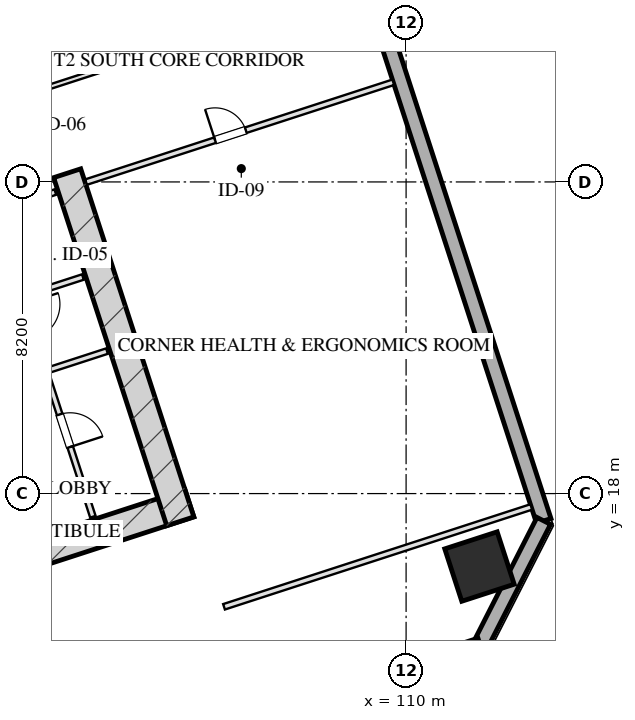
"""IFC4 building model, lengths in metres.
Left out: names, types, materials, properties, quantities, classifications, styles, units other than length and angle.
Written with IfcOpenShell. Run it as: python <this file> out.ifc"""

import sys

from ifc_helpers import new_model, si_unit, direction, frame, frame_2d, origin, origin_2d, place, context, subcontext, project, spatial, rectangle, hollow_rectangle, extrude, element, fill, save


model = new_model("IFC4")
c1 = context("Model", 3, precision=1e-05, world=origin(), true_north=direction((0.0, 1.0)))
c2 = subcontext(c1, "Body", "Model", "MODEL_VIEW")
j1 = project(units=[si_unit("LENGTHUNIT", "METRE"), si_unit("PLANEANGLEUNIT", "RADIAN")], contexts=[c1])
p1 = place(None, origin())
s1 = spatial("IfcSite", under=j1, at=p1, CompositionType="ELEMENT")
p2 = place(p1, origin())
s2 = spatial("IfcBuilding", under=s1, at=p2, CompositionType="ELEMENT")
p3 = place(p2, frame((0.0, 0.0, 85.1)))
s3 = spatial("IfcBuildingStorey", under=s2, at=p3, CompositionType="ELEMENT", Elevation=85.1)
p4 = place(p3, frame((88.559, 12.629, 0.0), z_axis=(0.0, 0.0, 1.0), x_axis=(0.951056072937, 0.309018358888, 0.0)))
e1 = element("IfcWall", 1, at=p4, inside=s3, PredefinedType="SHEAR", context=c2, shape_type="SweptSolid", body=[
    extrude(rectangle(XDim=16.55, YDim=0.75, at=frame_2d((8.275, 0.0))), origin(), (0.0, 0.0, 1.0), 3.45),
])
p5 = place(p3, frame((101.082, 26.429, 0.0), z_axis=(0.0, 0.0, 1.0), x_axis=(0.309016134813, -0.951056795583, 0.0)))
e2 = element("IfcWall", 2, at=p5, inside=s3, PredefinedType="SHEAR", context=c2, shape_type="SweptSolid", body=[
    extrude(rectangle(XDim=9.63, YDim=0.75, at=frame_2d((4.815, 0.0))), origin(), (0.0, 0.0, 1.0), 3.45),
])
p6 = place(p3, frame((111.931, 16.08, 0.0), z_axis=(0.0, 0.0, 1.0), x_axis=(0.951056516295, 0.309016994375, 0.0)))
e3 = element("IfcColumn", 3, at=p6, inside=s3, PredefinedType="COLUMN", context=c2, shape_type="SweptSolid", body=[
    extrude(hollow_rectangle(XDim=1.45, YDim=1.45, WallThickness=0.05, at=origin_2d()), origin(), (0.0, 0.0, 1.0), 3.451),
])
p7 = place(p3, frame((99.284, 61.41, 0.0), z_axis=(0.0, 0.0, 1.0), x_axis=(0.309017542002, -0.95105633836, 0.0)))
e4 = element("IfcWall", 4, at=p7, inside=s3, PredefinedType="SOLIDWALL", context=c2, shape_type="SweptSolid", body=[
    extrude(rectangle(XDim=46.4, YDim=0.4, at=frame_2d((23.2, 0.0))), origin(), (0.0, 0.0, 1.0), 2.61),
])
p8 = place(p7, frame((28.4, 0.0, 0.75)))
e5 = element("IfcOpeningElement", 5, at=p8, cuts=e4, PredefinedType="OPENING", context=c2, shape_type="SweptSolid", body=[
    extrude(rectangle(XDim=2.4, YDim=1.46, at=frame_2d((1.2, 0.73))), frame((0.0, 0.21, 0.0), z_axis=(0.0, -1.0, 0.0), x_axis=(1.0, 0.0, 0.0)), (0.0, 0.0, 1.0), 0.42),
])
p9 = place(p7, frame((19.4, 0.0, 0.75)))
e6 = element("IfcOpeningElement", 6, at=p9, cuts=e4, PredefinedType="OPENING", context=c2, shape_type="SweptSolid", body=[
    extrude(rectangle(XDim=2.4, YDim=1.46, at=frame_2d((1.2, 0.73))), frame((0.0, 0.21, 0.0), z_axis=(0.0, -1.0, 0.0), x_axis=(1.0, 0.0, 0.0)), (0.0, 0.0, 1.0), 0.42),
])
p10 = place(p7, frame((15.6, 0.0, 0.75)))
e7 = element("IfcOpeningElement", 7, at=p10, cuts=e4, PredefinedType="OPENING", context=c2, shape_type="SweptSolid", body=[
    extrude(rectangle(XDim=2.4, YDim=1.46, at=frame_2d((1.2, 0.73))), frame((0.0, 0.21, 0.0), z_axis=(0.0, -1.0, 0.0), x_axis=(1.0, 0.0, 0.0)), (0.0, 0.0, 1.0), 0.42),
])
p11 = place(p3, frame((113.623, 17.281, 0.0), z_axis=(0.0, 0.0, 1.0), x_axis=(-0.454026238093, -0.890988313685, 0.0)))
e8 = element("IfcWall", 8, at=p11, inside=s3, PredefinedType="SOLIDWALL", context=c2, shape_type="SweptSolid", body=[
    extrude(rectangle(XDim=3.677, YDim=0.4, at=frame_2d((1.838, 0.0))), origin(), (0.0, 0.0, 1.0), 2.61),
])
p12 = place(p3, frame((111.953, 14.005, 0.0), z_axis=(0.0, 0.0, 1.0), x_axis=(-0.95105505922, -0.309021478754, 0.0)))
e9 = element("IfcWall", 9, at=p12, inside=s3, PredefinedType="SOLIDWALL", context=c2, shape_type="SweptSolid", body=[
    extrude(rectangle(XDim=29.4, YDim=0.4, at=frame_2d((14.7, 0.0))), origin(), (0.0, 0.0, 1.0), 2.61),
])
p13 = place(p3, frame((97.727, 24.944, 0.0), z_axis=(0.0, 0.0, 1.0), x_axis=(0.951036872128, 0.309077446369, 0.0)))
e10 = element("IfcWall", 10, at=p13, inside=s3, PredefinedType="PARTITIONING", context=c2, shape_type="SweptSolid", body=[
    extrude(rectangle(XDim=3.2, YDim=0.15, at=frame_2d((1.6, 0.0))), origin(), (0.0, 0.0, 1.0), 3.175),
])
p14 = place(p13, frame((0.22, 0.0, 0.0)))
e11 = element("IfcOpeningElement", 11, at=p14, cuts=e10, PredefinedType="OPENING", context=c2, shape_type="SweptSolid", body=[
    extrude(rectangle(XDim=0.95, YDim=2.05, at=frame_2d((0.475, 1.025))), frame((0.0, 0.085, 0.0), z_axis=(0.0, -1.0, 0.0), x_axis=(1.0, 0.0, 0.0)), (0.0, 0.0, 1.0), 0.17),
])
p15 = place(p13, frame((1.95, 0.0, 0.0)))
e12 = element("IfcOpeningElement", 12, at=p15, cuts=e10, PredefinedType="OPENING", context=c2, shape_type="SweptSolid", body=[
    extrude(rectangle(XDim=0.9, YDim=2.05, at=frame_2d((0.45, 1.025))), frame((0.0, 0.085, 0.0), z_axis=(0.0, -1.0, 0.0), x_axis=(1.0, 0.0, 0.0)), (0.0, 0.0, 1.0), 0.17),
])
p16 = place(p3, frame((99.153, 25.408, 0.0), z_axis=(0.0, 0.0, 1.0), x_axis=(0.309016001439, -0.951056838919, 0.0)))
e13 = element("IfcWall", 13, at=p16, inside=s3, PredefinedType="PARTITIONING", context=c2, shape_type="SweptSolid", body=[
    extrude(rectangle(XDim=8.43, YDim=0.15, at=frame_2d((4.215, 0.0))), origin(), (0.0, 0.0, 1.0), 3.175),
])
p17 = place(p16, frame((2.55, 0.0, 0.0)))
e14 = element("IfcOpeningElement", 14, at=p17, cuts=e13, PredefinedType="OPENING", context=c2, shape_type="SweptSolid", body=[
    extrude(rectangle(XDim=0.95, YDim=2.05, at=frame_2d((0.475, 1.025))), frame((0.0, 0.085, 0.0), z_axis=(0.0, -1.0, 0.0), x_axis=(1.0, 0.0, 0.0)), (0.0, 0.0, 1.0), 0.17),
])
p18 = place(p16, frame((5.6, 0.0, 0.0)))
e15 = element("IfcOpeningElement", 15, at=p18, cuts=e13, PredefinedType="OPENING", context=c2, shape_type="SweptSolid", body=[
    extrude(rectangle(XDim=0.9, YDim=2.05, at=frame_2d((0.45, 1.025))), frame((0.0, 0.085, 0.0), z_axis=(0.0, -1.0, 0.0), x_axis=(1.0, 0.0, 0.0)), (0.0, 0.0, 1.0), 0.17),
])
for number, where, z_axis, x_axis in (
    (16, (100.513, 21.223, 0.0), (0.0, 0.0, 1.0), (0.951, 0.309, 0.0)),
    (17, (99.879, 23.173, 0.0), (0.0, 0.0, 1.0), (0.951, 0.309, 0.0)),
):
    element("IfcWall", number, at=place(p3, frame(where, z_axis=z_axis, x_axis=x_axis)), inside=s3, PredefinedType="PARTITIONING", context=c2, shape_type="SweptSolid", body=[
        extrude(rectangle(XDim=1.7, YDim=0.15, at=frame_2d((0.85, 0.0))), origin(), (0.0, 0.0, 1.0), 3.175),
    ])
p19 = place(p3, frame((105.209, 15.021, 0.0), z_axis=(0.0, 0.0, 1.0), x_axis=(0.951054329824, 0.309023723562, 0.0)))
e18 = element("IfcWall", 18, at=p19, inside=s3, PredefinedType="PARTITIONING", context=c2, shape_type="SweptSolid", body=[
    extrude(rectangle(XDim=8.5, YDim=0.15, at=frame_2d((4.25, 0.0))), origin(), (0.0, 0.0, 1.0), 3.175),
])
p20 = place(p3, frame((101.578, 26.196, 0.0), z_axis=(0.0, 0.0, 1.0), x_axis=(0.951062770994, 0.308997743729, 0.0)))
e19 = element("IfcWall", 19, at=p20, inside=s3, PredefinedType="PARTITIONING", context=c2, shape_type="SweptSolid", body=[
    extrude(rectangle(XDim=8.5, YDim=0.15, at=frame_2d((4.25, 0.0))), origin(), (0.0, 0.0, 1.0), 3.175),
])
p21 = place(p20, frame((3.57, 0.0, 0.0)))
e20 = element("IfcOpeningElement", 20, at=p21, cuts=e19, PredefinedType="OPENING", context=c2, shape_type="SweptSolid", body=[
    extrude(rectangle(XDim=0.85, YDim=2.05, at=frame_2d((0.425, 1.025))), frame((0.0, 0.085, 0.0), z_axis=(0.0, -1.0, 0.0), x_axis=(1.0, 0.0, 0.0)), (0.0, 0.0, 1.0), 0.17),
])
p22 = place(p3, frame((97.968, 27.841, 0.0), z_axis=(0.0, 0.0, 1.0), x_axis=(0.951055737546, 0.309019391108, 0.0)))
e21 = element("IfcWall", 21, at=p22, inside=s3, PredefinedType="PARTITIONING", context=c2, shape_type="SweptSolid", body=[
    extrude(rectangle(XDim=11.425, YDim=0.12, at=frame_2d((5.712, 0.0))), origin(), (0.0, 0.0, 1.0), 3.175),
])
p23 = place(p18, origin())
e22 = element("IfcDoor", 22, at=p23, inside=s3, OperationType="SINGLE_SWING_RIGHT", PredefinedType="DOOR", context=c2, shape_type="SweptSolid", body=[
    extrude(rectangle(XDim=0.9, YDim=2.05, at=frame_2d((0.45, 1.025))), frame((0.0, 0.025, 0.0), z_axis=(0.0, -1.0, 0.0), x_axis=(1.0, 0.0, 0.0)), (0.0, 0.0, 1.0), 0.05),
])
fill(e15, e22)
p24 = place(p21, origin())
e23 = element("IfcDoor", 23, at=p24, inside=s3, OperationType="SINGLE_SWING_LEFT", PredefinedType="DOOR", context=c2, shape_type="SweptSolid", body=[
    extrude(rectangle(XDim=0.85, YDim=2.05, at=frame_2d((0.425, 1.025))), frame((0.0, 0.025, 0.0), z_axis=(0.0, -1.0, 0.0), x_axis=(1.0, 0.0, 0.0)), (0.0, 0.0, 1.0), 0.05),
])
fill(e20, e23)
save(model, sys.argv[1])
